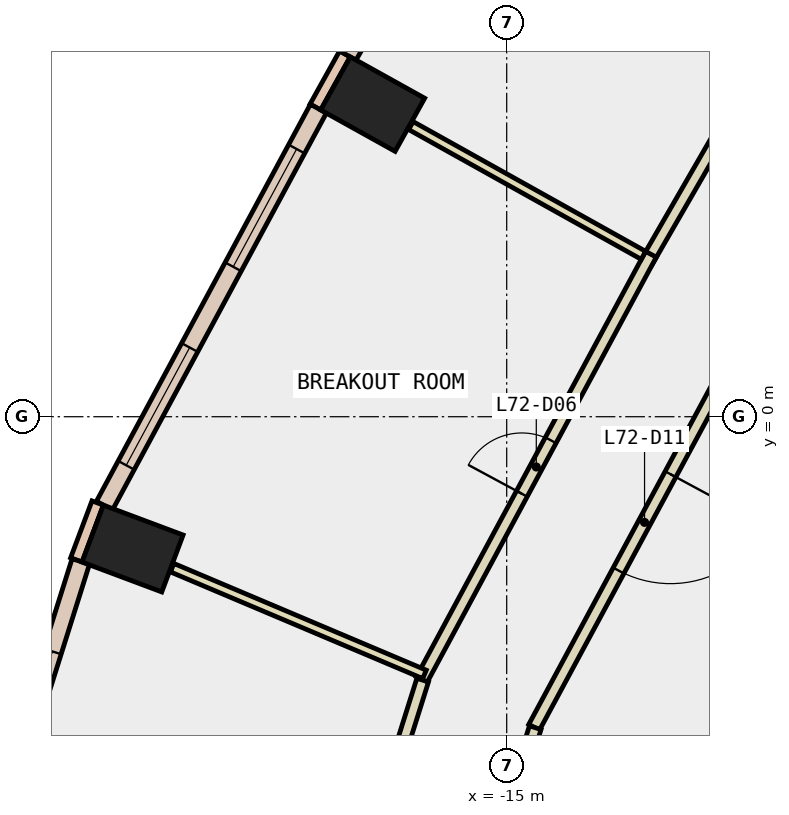
"""IFC4 building model, lengths in metres.
Left out: names, types, materials, properties, quantities, classifications, styles, units other than length and angle.
Written with IfcOpenShell. Run it as: python <this file> out.ifc"""

import sys

from ifc_helpers import new_model, si_unit, direction, frame, frame_2d, origin, origin_2d, place, context, subcontext, project, spatial, rectangle, extrude, element, fill, save


model = new_model("IFC4")
c1 = context("Model", 3, precision=1e-05, world=origin(), true_north=direction((0.0, 1.0)))
c2 = subcontext(c1, "Body", "Model", "MODEL_VIEW")
j1 = project(units=[si_unit("LENGTHUNIT", "METRE"), si_unit("PLANEANGLEUNIT", "RADIAN")], contexts=[c1])
p1 = place(None, origin())
s1 = spatial("IfcSite", under=j1, at=p1, CompositionType="ELEMENT")
p2 = place(p1, origin())
s2 = spatial("IfcBuilding", under=s1, at=p2, CompositionType="ELEMENT")
p3 = place(p2, frame((0.0, 0.0, 308.0)))
s3 = spatial("IfcBuildingStorey", under=s2, at=p3, CompositionType="ELEMENT", Elevation=308.0)
for number, where, z_axis, x_axis in (
    (1, (-17.204, 5.141, -0.34), (0.0, 0.0, 1.0), (0.486, 0.874, 0.0)),
    (2, (-21.153, -2.168, -0.34), (0.0, 0.0, 1.0), (0.351, 0.936, 0.0)),
):
    element("IfcColumn", number, at=place(p3, frame(where, z_axis=z_axis, x_axis=x_axis)), inside=s3, PredefinedType="COLUMN", context=c2, shape_type="SweptSolid", body=[
        extrude(rectangle(XDim=1.0, YDim=1.4, at=origin_2d()), origin(), (0.0, 0.0, 1.0), 3.6),
    ])
p4 = place(p3, frame((-6.279, -3.625, -0.34), z_axis=(0.0, 0.0, 1.0), x_axis=(-0.866017533419, -0.500013631625, 0.0)))
e3 = element("IfcWall", 3, at=p4, inside=s3, PredefinedType="SHEAR", context=c2, shape_type="SweptSolid", body=[
    extrude(rectangle(XDim=9.0, YDim=0.8, at=frame_2d((4.5, 0.0))), origin(), (0.0, 0.0, 1.0), 3.6),
])
p5 = place(p3, frame((-17.661, 5.966, 0.0), z_axis=(0.0, 0.0, 1.0), x_axis=(-0.486036693078, -0.873938403425, 0.0)))
e4 = element("IfcWall", 4, at=p5, inside=s3, PredefinedType="STANDARD", context=c2, shape_type="SweptSolid", body=[
    extrude(rectangle(XDim=1.0, YDim=0.2, at=frame_2d((0.5, 0.0))), origin(), (0.0, 0.0, 1.0), 3.26),
])
p6 = place(p3, frame((-21.727, -1.419, 0.0), z_axis=(0.0, 0.0, 1.0), x_axis=(-0.350962844851, -0.936389385637, 0.0)))
e5 = element("IfcWall", 5, at=p6, inside=s3, PredefinedType="STANDARD", context=c2, shape_type="SweptSolid", body=[
    extrude(rectangle(XDim=1.0, YDim=0.2, at=frame_2d((0.5, 0.0))), origin(), (0.0, 0.0, 1.0), 3.26),
])
p7 = place(p3, frame((-13.947, 12.283, 0.0), z_axis=(0.0, 0.0, 1.0), x_axis=(-0.499923391538, -0.866069629183, 0.0)))
e6 = element("IfcWall", 6, at=p7, inside=s3, PredefinedType="STANDARD", context=c2, shape_type="SweptSolid", body=[
    extrude(rectangle(XDim=7.327, YDim=0.3, at=frame_2d((3.664, 0.0))), origin(), (0.0, 0.0, 1.0), 3.26),
])
p8 = place(p7, frame((0.732, 0.0, 0.9)))
e7 = element("IfcOpeningElement", 7, at=p8, cuts=e6, PredefinedType="OPENING", context=c2, shape_type="SweptSolid", body=[
    extrude(rectangle(XDim=2.2, YDim=2.0, at=frame_2d((1.1, 1.0))), frame((0.0, 0.16, 0.0), z_axis=(0.0, -1.0, 0.0), x_axis=(1.0, 0.0, 0.0)), (0.0, 0.0, 1.0), 0.32),
])
p9 = place(p7, frame((4.395, 0.0, 0.9)))
e8 = element("IfcOpeningElement", 8, at=p9, cuts=e6, PredefinedType="OPENING", context=c2, shape_type="SweptSolid", body=[
    extrude(rectangle(XDim=2.2, YDim=2.0, at=frame_2d((1.1, 1.0))), frame((0.0, 0.16, 0.0), z_axis=(0.0, -1.0, 0.0), x_axis=(1.0, 0.0, 0.0)), (0.0, 0.0, 1.0), 0.32),
])
p10 = place(p3, frame((-18.097, 5.066, 0.0), z_axis=(0.0, 0.0, 1.0), x_axis=(-0.474421773145, -0.880297666228, 0.0)))
e9 = element("IfcWall", 9, at=p10, inside=s3, PredefinedType="STANDARD", context=c2, shape_type="SweptSolid", body=[
    extrude(rectangle(XDim=7.416, YDim=0.3, at=frame_2d((3.708, 0.0))), origin(), (0.0, 0.0, 1.0), 3.26),
])
p11 = place(p10, frame((0.754, 0.0, 0.9)))
e10 = element("IfcOpeningElement", 10, at=p11, cuts=e9, PredefinedType="OPENING", context=c2, shape_type="SweptSolid", body=[
    extrude(rectangle(XDim=2.2, YDim=2.0, at=frame_2d((1.1, 1.0))), frame((0.0, 0.16, 0.0), z_axis=(0.0, -1.0, 0.0), x_axis=(1.0, 0.0, 0.0)), (0.0, 0.0, 1.0), 0.32),
])
p12 = place(p10, frame((4.462, 0.0, 0.9)))
e11 = element("IfcOpeningElement", 11, at=p12, cuts=e9, PredefinedType="OPENING", context=c2, shape_type="SweptSolid", body=[
    extrude(rectangle(XDim=2.2, YDim=2.0, at=frame_2d((1.1, 1.0))), frame((0.0, 0.16, 0.0), z_axis=(0.0, -1.0, 0.0), x_axis=(1.0, 0.0, 0.0)), (0.0, 0.0, 1.0), 0.32),
])
p13 = place(p3, frame((-22.005, -2.381, 0.0), z_axis=(0.0, 0.0, 1.0), x_axis=(-0.300534385574, -0.953770980418, 0.0)))
e12 = element("IfcWall", 12, at=p13, inside=s3, PredefinedType="STANDARD", context=c2, shape_type="SweptSolid", body=[
    extrude(rectangle(XDim=4.502, YDim=0.3, at=frame_2d((2.251, 0.0))), origin(), (0.0, 0.0, 1.0), 3.26),
])
p14 = place(p13, frame((1.551, 0.0, 0.9)))
e13 = element("IfcOpeningElement", 13, at=p14, cuts=e12, PredefinedType="OPENING", context=c2, shape_type="SweptSolid", body=[
    extrude(rectangle(XDim=1.4, YDim=2.0, at=frame_2d((0.7, 1.0))), frame((0.0, 0.16, 0.0), z_axis=(0.0, -1.0, 0.0), x_axis=(1.0, 0.0, 0.0)), (0.0, 0.0, 1.0), 0.32),
])
p15 = place(p3, frame((-10.917, 1.631, 0.0), z_axis=(0.0, 0.0, 1.0), x_axis=(-0.47449538478, -0.880257990491, 0.0)))
e14 = element("IfcWall", 14, at=p15, inside=s3, PredefinedType="PARTITIONING", context=c2, shape_type="SweptSolid", body=[
    extrude(rectangle(XDim=7.655, YDim=0.2, at=frame_2d((3.827, 0.0))), origin(), (0.0, 0.0, 1.0), 3.26),
])
p16 = place(p15, frame((2.927, 0.0, 0.0)))
e15 = element("IfcOpeningElement", 15, at=p16, cuts=e14, PredefinedType="OPENING", context=c2, shape_type="SweptSolid", body=[
    extrude(rectangle(XDim=1.8, YDim=2.1, at=frame_2d((0.9, 1.05))), frame((0.0, 0.11, 0.0), z_axis=(0.0, -1.0, 0.0), x_axis=(1.0, 0.0, 0.0)), (0.0, 0.0, 1.0), 0.22),
])
p17 = place(p3, frame((-14.531, -5.114, 0.0), z_axis=(0.0, 0.0, 1.0), x_axis=(-0.300501248013, -0.953781421471, 0.0)))
e16 = element("IfcWall", 16, at=p17, inside=s3, PredefinedType="PARTITIONING", context=c2, shape_type="SweptSolid", body=[
    extrude(rectangle(XDim=2.559, YDim=0.2, at=frame_2d((1.28, 0.0))), origin(), (0.0, 0.0, 1.0), 3.26),
])
p18 = place(p3, frame((-12.701, 2.54, 0.0), z_axis=(0.0, 0.0, 1.0), x_axis=(0.499946799636, 0.86605611685, 0.0)))
e17 = element("IfcWall", 17, at=p18, inside=s3, PredefinedType="PARTITIONING", context=c2, shape_type="SweptSolid", body=[
    extrude(rectangle(XDim=8.227, YDim=0.2, at=frame_2d((4.114, 0.0))), origin(), (0.0, 0.0, 1.0), 3.26),
])
p19 = place(p18, frame((3.613, 0.0, 0.0)))
e18 = element("IfcOpeningElement", 18, at=p19, cuts=e17, PredefinedType="OPENING", context=c2, shape_type="SweptSolid", body=[
    extrude(rectangle(XDim=1.0, YDim=2.1, at=frame_2d((0.5, 1.05))), frame((0.0, 0.11, 0.0), z_axis=(0.0, -1.0, 0.0), x_axis=(1.0, 0.0, 0.0)), (0.0, 0.0, 1.0), 0.22),
])
p20 = place(p3, frame((-16.399, -4.325, 0.0), z_axis=(0.0, 0.0, 1.0), x_axis=(0.474489967676, 0.880260910512, 0.0)))
e19 = element("IfcWall", 19, at=p20, inside=s3, PredefinedType="PARTITIONING", context=c2, shape_type="SweptSolid", body=[
    extrude(rectangle(XDim=7.948, YDim=0.2, at=frame_2d((3.974, 0.0))), origin(), (0.0, 0.0, 1.0), 3.26),
])
p21 = place(p20, frame((3.474, 0.0, 0.0)))
e20 = element("IfcOpeningElement", 20, at=p21, cuts=e19, PredefinedType="OPENING", context=c2, shape_type="SweptSolid", body=[
    extrude(rectangle(XDim=1.0, YDim=2.1, at=frame_2d((0.5, 1.05))), frame((0.0, 0.11, 0.0), z_axis=(0.0, -1.0, 0.0), x_axis=(1.0, 0.0, 0.0)), (0.0, 0.0, 1.0), 0.22),
])
p22 = place(p3, frame((-17.375, -7.487, 0.0), z_axis=(0.0, 0.0, 1.0), x_axis=(0.300195088058, 0.953877827138, 0.0)))
e21 = element("IfcWall", 21, at=p22, inside=s3, PredefinedType="PARTITIONING", context=c2, shape_type="SweptSolid", body=[
    extrude(rectangle(XDim=3.308, YDim=0.2, at=frame_2d((1.654, 0.0))), origin(), (0.0, 0.0, 1.0), 3.26),
])
p23 = place(p3, frame((-12.751, 2.654, 0.0), z_axis=(0.0, 0.0, 1.0), x_axis=(-0.873277679945, 0.487222837837, 0.0)))
e22 = element("IfcWall", 22, at=p23, inside=s3, PredefinedType="PARTITIONING", context=c2, shape_type="SweptSolid", body=[
    extrude(rectangle(XDim=4.38, YDim=0.15, at=frame_2d((2.19, 0.0))), origin(), (0.0, 0.0, 1.0), 3.26),
])
p24 = place(p3, frame((-16.352, -4.237, 0.0), z_axis=(0.0, 0.0, 1.0), x_axis=(-0.921092849348, 0.389342988738, 0.0)))
e23 = element("IfcWall", 23, at=p24, inside=s3, PredefinedType="PARTITIONING", context=c2, shape_type="SweptSolid", body=[
    extrude(rectangle(XDim=4.505, YDim=0.15, at=frame_2d((2.253, 0.0))), origin(), (0.0, 0.0, 1.0), 3.26),
])
p25 = place(p11, origin())
e24 = element("IfcWindow", 24, at=p25, inside=s3, PartitioningType="SINGLE_PANEL", PredefinedType="WINDOW", context=c2, shape_type="SweptSolid", body=[
    extrude(rectangle(XDim=2.2, YDim=2.0, at=frame_2d((1.1, 1.0))), frame((0.0, 0.03, 0.0), z_axis=(0.0, -1.0, 0.0), x_axis=(1.0, 0.0, 0.0)), (0.0, 0.0, 1.0), 0.06),
])
fill(e10, e24)
p26 = place(p12, origin())
e25 = element("IfcWindow", 25, at=p26, inside=s3, PartitioningType="SINGLE_PANEL", PredefinedType="WINDOW", context=c2, shape_type="SweptSolid", body=[
    extrude(rectangle(XDim=2.2, YDim=2.0, at=frame_2d((1.1, 1.0))), frame((0.0, 0.03, 0.0), z_axis=(0.0, -1.0, 0.0), x_axis=(1.0, 0.0, 0.0)), (0.0, 0.0, 1.0), 0.06),
])
fill(e11, e25)
p27 = place(p14, origin())
e26 = element("IfcWindow", 26, at=p27, inside=s3, PartitioningType="SINGLE_PANEL", PredefinedType="WINDOW", context=c2, shape_type="SweptSolid", body=[
    extrude(rectangle(XDim=1.4, YDim=2.0, at=frame_2d((0.7, 1.0))), frame((0.0, 0.03, 0.0), z_axis=(0.0, -1.0, 0.0), x_axis=(1.0, 0.0, 0.0)), (0.0, 0.0, 1.0), 0.06),
])
fill(e13, e26)
p28 = place(p21, origin())
e27 = element("IfcDoor", 27, at=p28, inside=s3, OperationType="SINGLE_SWING_LEFT", PredefinedType="DOOR", context=c2, shape_type="SweptSolid", body=[
    extrude(rectangle(XDim=1.0, YDim=2.1, at=frame_2d((0.5, 1.05))), frame((0.0, 0.025, 0.0), z_axis=(0.0, -1.0, 0.0), x_axis=(1.0, 0.0, 0.0)), (0.0, 0.0, 1.0), 0.05),
])
fill(e20, e27)
p29 = place(p16, origin())
e28 = element("IfcDoor", 28, at=p29, inside=s3, OperationType="DOUBLE_DOOR_SINGLE_SWING", PredefinedType="DOOR", context=c2, shape_type="SweptSolid", body=[
    extrude(rectangle(XDim=1.8, YDim=2.1, at=frame_2d((0.9, 1.05))), frame((0.0, 0.025, 0.0), z_axis=(0.0, -1.0, 0.0), x_axis=(1.0, 0.0, 0.0)), (0.0, 0.0, 1.0), 0.05),
])
fill(e15, e28)
save(model, sys.argv[1])
